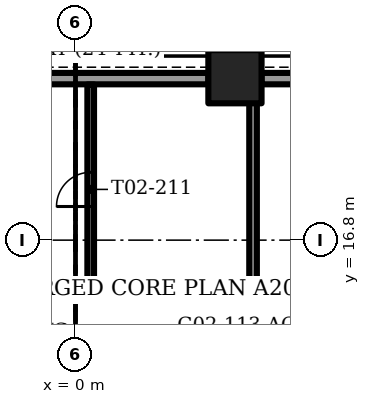
"""IFC4 building model, lengths in metres.
Left out: names, types, materials, properties, quantities, classifications, styles, units other than length and angle.
Written with IfcOpenShell. Run it as: python <this file> out.ifc"""

import sys

from ifc_helpers import new_model, si_unit, direction, frame, frame_2d, origin, origin_2d, place, context, subcontext, project, spatial, rectangle, extrude, element, fill, save


model = new_model("IFC4")
c1 = context("Model", 3, precision=1e-05, world=origin(), true_north=direction((0.0, 1.0)))
c2 = subcontext(c1, "Body", "Model", "MODEL_VIEW")
j1 = project(units=[si_unit("LENGTHUNIT", "METRE"), si_unit("PLANEANGLEUNIT", "RADIAN")], contexts=[c1])
p1 = place(None, origin())
s1 = spatial("IfcSite", under=j1, at=p1, CompositionType="ELEMENT")
p2 = place(p1, origin())
s2 = spatial("IfcBuilding", under=s1, at=p2, CompositionType="ELEMENT")
p3 = place(p2, frame((0.0, 0.0, 10.0)))
s3 = spatial("IfcBuildingStorey", under=s2, at=p3, CompositionType="ELEMENT", Elevation=10.0)
p4 = place(p3, frame((4.195, 21.1, -1.2), z_axis=(0.0, 0.0, 1.0), x_axis=(1.0, 0.0, 0.0)))
e1 = element("IfcColumn", 1, at=p4, inside=s3, PredefinedType="COLUMN", context=c2, shape_type="SweptSolid", body=[
    extrude(rectangle(XDim=1.4, YDim=1.4, at=origin_2d()), origin(), (0.0, 0.0, 1.0), 4.5),
])
p5 = place(p3, frame((11.377, 21.05, 0.0), z_axis=(0.0, 0.0, 1.0), x_axis=(-1.0, 0.0, 0.0)))
e2 = element("IfcWall", 2, at=p5, inside=s3, PredefinedType="SOLIDWALL", context=c2, shape_type="SweptSolid", body=[
    extrude(rectangle(XDim=6.481, YDim=0.3, at=frame_2d((3.241, 0.0))), origin(), (0.0, 0.0, 1.0), 3.3),
])
p6 = place(p3, frame((3.495, 21.05, 0.0), z_axis=(0.0, 0.0, 1.0), x_axis=(-1.0, 0.0, 0.0)))
e3 = element("IfcWall", 3, at=p6, inside=s3, PredefinedType="SOLIDWALL", context=c2, shape_type="SweptSolid", body=[
    extrude(rectangle(XDim=6.991, YDim=0.3, at=frame_2d((3.495, 0.0))), origin(), (0.0, 0.0, 1.0), 3.3),
])
p7 = place(p3, frame((0.4, 15.6, 0.0), z_axis=(0.0, 0.0, 1.0), x_axis=(1.0, 0.0, 0.0)))
e4 = element("IfcWall", 4, at=p7, inside=s3, PredefinedType="PARTITIONING", context=c2, shape_type="SweptSolid", body=[
    extrude(rectangle(XDim=10.1, YDim=0.175, at=frame_2d((5.05, 0.0))), origin(), (0.0, 0.0, 1.0), 4.2),
])
p8 = place(p7, frame((6.016, 0.0, 0.0)))
e5 = element("IfcOpeningElement", 5, at=p8, cuts=e4, PredefinedType="OPENING", context=c2, shape_type="SweptSolid", body=[
    extrude(rectangle(XDim=0.9, YDim=2.1, at=frame_2d((0.45, 1.05))), frame((0.0, 0.087, 0.0), z_axis=(0.0, -1.0, 0.0), x_axis=(1.0, 0.0, 0.0)), (0.0, 0.0, 1.0), 0.175),
])
p9 = place(p3, frame((0.4, 15.6, 0.0), z_axis=(0.0, 0.0, 1.0), x_axis=(0.0, 1.0, 0.0)))
e6 = element("IfcWall", 6, at=p9, inside=s3, PredefinedType="PARTITIONING", context=c2, shape_type="SweptSolid", body=[
    extrude(rectangle(XDim=5.295, YDim=0.175, at=frame_2d((2.647, 0.0))), origin(), (0.0, 0.0, 1.0), 4.2),
])
p10 = place(p9, frame((2.085, 0.0, 0.0)))
e7 = element("IfcOpeningElement", 7, at=p10, cuts=e6, PredefinedType="OPENING", context=c2, shape_type="SweptSolid", body=[
    extrude(rectangle(XDim=0.9, YDim=2.1, at=frame_2d((0.45, 1.05))), frame((0.0, 0.087, 0.0), z_axis=(0.0, -1.0, 0.0), x_axis=(1.0, 0.0, 0.0)), (0.0, 0.0, 1.0), 0.175),
])
p11 = place(p3, frame((4.672, 15.6, 0.0), z_axis=(0.0, 0.0, 1.0), x_axis=(0.0, 1.0, 0.0)))
e8 = element("IfcWall", 8, at=p11, inside=s3, PredefinedType="PARTITIONING", context=c2, shape_type="SweptSolid", body=[
    extrude(rectangle(XDim=5.07, YDim=0.2, at=frame_2d((2.535, 0.0))), origin(), (0.0, 0.0, 1.0), 4.2),
])
p12 = place(p10, origin())
e9 = element("IfcDoor", 9, at=p12, inside=s3, OperationType="SINGLE_SWING_LEFT", PredefinedType="DOOR", context=c2, shape_type="SweptSolid", body=[
    extrude(rectangle(XDim=0.9, YDim=2.1, at=frame_2d((0.45, 1.05))), frame((0.0, 0.025, 0.0), z_axis=(0.0, -1.0, 0.0), x_axis=(1.0, 0.0, 0.0)), (0.0, 0.0, 1.0), 0.05),
])
fill(e7, e9)
save(model, sys.argv[1])
